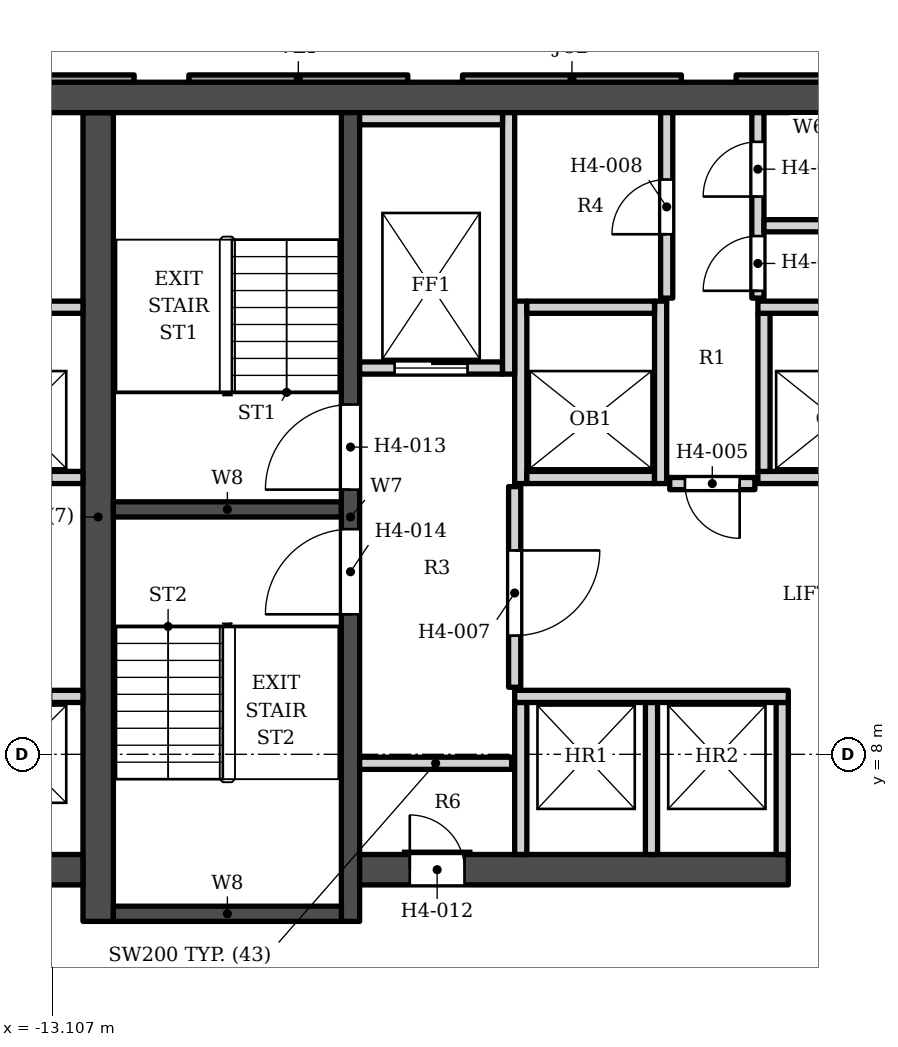
"""IFC4 building model, lengths in metres.
Left out: names, types, materials, properties, quantities, classifications, styles, units other than length and angle.
Written with IfcOpenShell. Run it as: python <this file> out.ifc"""

import sys

from ifc_helpers import new_model, si_unit, direction, frame, frame_2d, origin, place, context, subcontext, project, spatial, polyline, rectangle, outline, extrude, element, fill, save


model = new_model("IFC4")
c1 = context("Model", 3, precision=1e-05, world=origin(), true_north=direction((0.0, 1.0)))
c2 = subcontext(c1, "Body", "Model", "MODEL_VIEW")
j1 = project(units=[si_unit("LENGTHUNIT", "METRE"), si_unit("PLANEANGLEUNIT", "RADIAN")], contexts=[c1])
p1 = place(None, origin())
s1 = spatial("IfcSite", under=j1, at=p1, CompositionType="ELEMENT")
p2 = place(p1, origin())
s2 = spatial("IfcBuilding", under=s1, at=p2, CompositionType="ELEMENT")
p3 = place(p2, frame((0.0, 0.0, 76.6)))
s3 = spatial("IfcBuildingStorey", under=s2, at=p3, CompositionType="ELEMENT", Elevation=76.6)
p4 = place(p3, frame((-16.9, 18.802, 0.0), z_axis=(0.0, 0.0, 1.0), x_axis=(1.0, 0.0, 0.0)))
e1 = element("IfcWall", 1, at=p4, inside=s3, PredefinedType="SHEAR", context=c2, shape_type="SweptSolid", body=[
    extrude(rectangle(XDim=33.8, YDim=0.5, at=frame_2d((16.9, 0.0))), origin(), (0.0, 0.0, 1.0), 3.4),
])
p5 = place(p3, frame((-12.35, 5.253, 0.0), z_axis=(0.0, 0.0, 1.0), x_axis=(0.0, 1.0, 0.0)))
e2 = element("IfcWall", 2, at=p5, inside=s3, PredefinedType="SHEAR", context=c2, shape_type="SweptSolid", body=[
    extrude(rectangle(XDim=13.3, YDim=0.5, at=frame_2d((6.65, 0.0))), origin(), (0.0, 0.0, 1.0), 3.4),
])
p6 = place(p3, frame((-8.2, 5.253, 0.0), z_axis=(0.0, 0.0, 1.0), x_axis=(0.0, 1.0, 0.0)))
e3 = element("IfcWall", 3, at=p6, inside=s3, PredefinedType="SHEAR", context=c2, shape_type="SweptSolid", body=[
    extrude(rectangle(XDim=13.3, YDim=0.3, at=frame_2d((6.65, 0.0))), origin(), (0.0, 0.0, 1.0), 3.4),
])
p7 = place(p6, frame((7.1, 0.0, 0.0)))
e4 = element("IfcOpeningElement", 4, at=p7, cuts=e3, PredefinedType="OPENING", context=c2, shape_type="SweptSolid", body=[
    extrude(rectangle(XDim=1.4, YDim=2.1, at=frame_2d((0.7, 1.05))), frame((0.0, 0.16, 0.0), z_axis=(0.0, -1.0, 0.0), x_axis=(1.0, 0.0, 0.0)), (0.0, 0.0, 1.0), 0.32),
])
p8 = place(p6, frame((5.05, 0.0, 0.0)))
e5 = element("IfcOpeningElement", 5, at=p8, cuts=e3, PredefinedType="OPENING", context=c2, shape_type="SweptSolid", body=[
    extrude(rectangle(XDim=1.4, YDim=2.1, at=frame_2d((0.7, 1.05))), frame((0.0, 0.16, 0.0), z_axis=(0.0, -1.0, 0.0), x_axis=(1.0, 0.0, 0.0)), (0.0, 0.0, 1.0), 0.32),
])
for number, where, z_axis, x_axis in (
    (6, (-12.1, 12.028, 0.0), (0.0, 0.0, 1.0), (1.0, 0.0, 0.0)),
    (7, (-12.1, 5.378, 0.0), (0.0, 0.0, 1.0), (1.0, 0.0, 0.0)),
):
    element("IfcWall", number, at=place(p3, frame(where, z_axis=z_axis, x_axis=x_axis)), inside=s3, PredefinedType="SHEAR", context=c2, shape_type="SweptSolid", body=[
        extrude(rectangle(XDim=3.75, YDim=0.25, at=frame_2d((1.875, 0.0))), origin(), (0.0, 0.0, 1.0), 3.4),
    ])
p9 = place(p3, frame((-8.05, 6.103, 0.0), z_axis=(0.0, 0.0, 1.0), x_axis=(1.0, 0.0, 0.0)))
e8 = element("IfcWall", 8, at=p9, inside=s3, PredefinedType="SHEAR", context=c2, shape_type="SweptSolid", body=[
    extrude(rectangle(XDim=7.05, YDim=0.5, at=frame_2d((3.525, 0.0))), origin(), (0.0, 0.0, 1.0), 3.4),
])
p10 = place(p9, frame((0.825, 0.0, 0.0)))
e9 = element("IfcOpeningElement", 9, at=p10, cuts=e8, PredefinedType="OPENING", context=c2, shape_type="SweptSolid", body=[
    extrude(rectangle(XDim=0.9, YDim=2.1, at=frame_2d((0.45, 1.05))), frame((0.0, 0.26, 0.0), z_axis=(0.0, -1.0, 0.0), x_axis=(1.0, 0.0, 0.0)), (0.0, 0.0, 1.0), 0.52),
])
p11 = place(p3, frame((-12.6, 6.103, 0.0), z_axis=(0.0, 0.0, 1.0), x_axis=(-1.0, 0.0, 0.0)))
e10 = element("IfcWall", 10, at=p11, inside=s3, PredefinedType="SHEAR", context=c2, shape_type="SweptSolid", body=[
    extrude(rectangle(XDim=4.3, YDim=0.5, at=frame_2d((2.15, 0.0))), origin(), (0.0, 0.0, 1.0), 3.4),
])
p12 = place(p3, origin())
e11 = element("IfcWall", 11, at=p12, inside=s3, PredefinedType="ELEMENTEDWALL", context=c2, shape_type="SweptSolid", body=[
    extrude(outline(polyline([(-1.858, 19.173), (-1.858, 19.052), (1.742, 19.052), (1.742, 19.173), (-1.858, 19.173)])), origin(), (0.0, 0.0, 1.0), 2.65),
])
p13 = place(p3, origin())
e12 = element("IfcWall", 12, at=p13, inside=s3, PredefinedType="SOLIDWALL", context=c2, shape_type="SweptSolid", body=[
    extrude(outline(polyline([(-6.358, 19.173), (-6.358, 19.052), (-2.758, 19.052), (-2.758, 19.173), (-6.358, 19.173)])), origin(), (0.0, 0.0, 1.0), 2.65),
])
p14 = place(p3, origin())
e13 = element("IfcWall", 13, at=p14, inside=s3, PredefinedType="ELEMENTEDWALL", context=c2, shape_type="SweptSolid", body=[
    extrude(outline(polyline([(-10.858, 19.173), (-10.858, 19.052), (-7.258, 19.052), (-7.258, 19.173), (-10.858, 19.173)])), origin(), (0.0, 0.0, 1.0), 2.65),
])
p15 = place(p3, origin())
e14 = element("IfcWall", 14, at=p15, inside=s3, PredefinedType="SOLIDWALL", context=c2, shape_type="SweptSolid", body=[
    extrude(outline(polyline([(-15.358, 19.173), (-15.358, 19.052), (-11.758, 19.052), (-11.758, 19.173), (-15.358, 19.173)])), origin(), (0.0, 0.0, 1.0), 2.65),
])
for number, where, z_axis, x_axis in (
    (15, (-5.4, 6.353, 0.0), (0.0, 0.0, 1.0), (0.0, 1.0, 0.0)),
    (16, (-3.25, 6.353, 0.0), (0.0, 0.0, 1.0), (0.0, 1.0, 0.0)),
    (17, (-1.1, 6.353, 0.0), (0.0, 0.0, 1.0), (0.0, 1.0, 0.0)),
    (18, (-8.05, 7.853, 0.0), (0.0, 0.0, 1.0), (1.0, 0.0, 0.0)),
):
    element("IfcWall", number, at=place(p3, frame(where, z_axis=z_axis, x_axis=x_axis)), inside=s3, PredefinedType="SOLIDWALL", context=c2, shape_type="SweptSolid", body=[
        extrude(rectangle(XDim=2.5, YDim=0.2, at=frame_2d((1.25, 0.0))), origin(), (0.0, 0.0, 1.0), 3.23),
    ])
p16 = place(p3, frame((-16.9, 8.953, 0.0), z_axis=(0.0, 0.0, 1.0), x_axis=(1.0, 0.0, 0.0)))
e19 = element("IfcWall", 19, at=p16, inside=s3, PredefinedType="SOLIDWALL", context=c2, shape_type="SweptSolid", body=[
    extrude(rectangle(XDim=4.3, YDim=0.2, at=frame_2d((2.15, 0.0))), origin(), (0.0, 0.0, 1.0), 3.23),
])
p17 = place(p16, frame((2.675, 0.0, 0.0)))
e20 = element("IfcOpeningElement", 20, at=p17, cuts=e19, PredefinedType="OPENING", context=c2, shape_type="SweptSolid", body=[
    extrude(rectangle(XDim=1.1, YDim=2.1, at=frame_2d((0.55, 1.05))), frame((0.0, 0.11, 0.0), z_axis=(0.0, -1.0, 0.0), x_axis=(1.0, 0.0, 0.0)), (0.0, 0.0, 1.0), 0.22),
])
p18 = place(p16, frame((0.425, 0.0, 0.0)))
e21 = element("IfcOpeningElement", 21, at=p18, cuts=e19, PredefinedType="OPENING", context=c2, shape_type="SweptSolid", body=[
    extrude(rectangle(XDim=1.1, YDim=2.1, at=frame_2d((0.55, 1.05))), frame((0.0, 0.11, 0.0), z_axis=(0.0, -1.0, 0.0), x_axis=(1.0, 0.0, 0.0)), (0.0, 0.0, 1.0), 0.22),
])
p19 = place(p3, frame((-5.5, 8.953, 0.0), z_axis=(0.0, 0.0, 1.0), x_axis=(1.0, 0.0, 0.0)))
e22 = element("IfcWall", 22, at=p19, inside=s3, PredefinedType="SOLIDWALL", context=c2, shape_type="SweptSolid", body=[
    extrude(rectangle(XDim=4.5, YDim=0.2, at=frame_2d((2.25, 0.0))), origin(), (0.0, 0.0, 1.0), 3.23),
])
p20 = place(p3, frame((-5.5, 9.103, 0.0), z_axis=(0.0, 0.0, 1.0), x_axis=(0.0, 1.0, 0.0)))
e23 = element("IfcWall", 23, at=p20, inside=s3, PredefinedType="SOLIDWALL", context=c2, shape_type="SweptSolid", body=[
    extrude(rectangle(XDim=3.3, YDim=0.2, at=frame_2d((1.65, 0.0))), origin(), (0.0, 0.0, 1.0), 3.23),
])
p21 = place(p20, frame((0.85, 0.0, 0.0)))
e24 = element("IfcOpeningElement", 24, at=p21, cuts=e23, PredefinedType="OPENING", context=c2, shape_type="SweptSolid", body=[
    extrude(rectangle(XDim=1.4, YDim=2.1, at=frame_2d((0.7, 1.05))), frame((0.0, 0.11, 0.0), z_axis=(0.0, -1.0, 0.0), x_axis=(1.0, 0.0, 0.0)), (0.0, 0.0, 1.0), 0.22),
])
p22 = place(p3, frame((-2.95, 12.453, 0.0), z_axis=(0.0, 0.0, 1.0), x_axis=(1.0, 0.0, 0.0)))
e25 = element("IfcWall", 25, at=p22, inside=s3, PredefinedType="SOLIDWALL", context=c2, shape_type="SweptSolid", body=[
    extrude(rectangle(XDim=1.4, YDim=0.2, at=frame_2d((0.7, 0.0))), origin(), (0.0, 0.0, 1.0), 3.23),
])
p23 = place(p22, frame((0.25, 0.0, 0.0)))
e26 = element("IfcOpeningElement", 26, at=p23, cuts=e25, PredefinedType="OPENING", context=c2, shape_type="SweptSolid", body=[
    extrude(rectangle(XDim=0.9, YDim=2.1, at=frame_2d((0.45, 1.05))), frame((0.0, 0.11, 0.0), z_axis=(0.0, -1.0, 0.0), x_axis=(1.0, 0.0, 0.0)), (0.0, 0.0, 1.0), 0.22),
])
p24 = place(p3, frame((-16.9, 12.552, 0.0), z_axis=(0.0, 0.0, 1.0), x_axis=(1.0, 0.0, 0.0)))
e27 = element("IfcWall", 27, at=p24, inside=s3, PredefinedType="SOLIDWALL", context=c2, shape_type="SweptSolid", body=[
    extrude(rectangle(XDim=4.3, YDim=0.2, at=frame_2d((2.15, 0.0))), origin(), (0.0, 0.0, 1.0), 3.23),
])
p25 = place(p24, frame((2.675, 0.0, 0.0)))
e28 = element("IfcOpeningElement", 28, at=p25, cuts=e27, PredefinedType="OPENING", context=c2, shape_type="SweptSolid", body=[
    extrude(rectangle(XDim=1.1, YDim=2.1, at=frame_2d((0.55, 1.05))), frame((0.0, 0.11, 0.0), z_axis=(0.0, -1.0, 0.0), x_axis=(1.0, 0.0, 0.0)), (0.0, 0.0, 1.0), 0.22),
])
p26 = place(p24, frame((0.425, 0.0, 0.0)))
e29 = element("IfcOpeningElement", 29, at=p26, cuts=e27, PredefinedType="OPENING", context=c2, shape_type="SweptSolid", body=[
    extrude(rectangle(XDim=1.1, YDim=2.1, at=frame_2d((0.55, 1.05))), frame((0.0, 0.11, 0.0), z_axis=(0.0, -1.0, 0.0), x_axis=(1.0, 0.0, 0.0)), (0.0, 0.0, 1.0), 0.22),
])
p27 = place(p3, frame((-5.4, 12.453, 0.0), z_axis=(0.0, 0.0, 1.0), x_axis=(0.0, 1.0, 0.0)))
e30 = element("IfcWall", 30, at=p27, inside=s3, PredefinedType="SOLIDWALL", context=c2, shape_type="SweptSolid", body=[
    extrude(rectangle(XDim=3.0, YDim=0.2, at=frame_2d((1.5, 0.0))), origin(), (0.0, 0.0, 1.0), 3.23),
])
p28 = place(p3, frame((-5.3, 12.552, 0.0), z_axis=(0.0, 0.0, 1.0), x_axis=(1.0, 0.0, 0.0)))
e31 = element("IfcWall", 31, at=p28, inside=s3, PredefinedType="SOLIDWALL", context=c2, shape_type="SweptSolid", body=[
    extrude(rectangle(XDim=2.1, YDim=0.2, at=frame_2d((1.05, 0.0))), origin(), (0.0, 0.0, 1.0), 3.23),
])
p29 = place(p3, frame((-3.1, 12.453, 0.0), z_axis=(0.0, 0.0, 1.0), x_axis=(0.0, 1.0, 0.0)))
e32 = element("IfcWall", 32, at=p29, inside=s3, PredefinedType="SOLIDWALL", context=c2, shape_type="SweptSolid", body=[
    extrude(rectangle(XDim=3.0, YDim=0.2, at=frame_2d((1.5, 0.0))), origin(), (0.0, 0.0, 1.0), 3.23),
])
p30 = place(p3, frame((-1.5, 12.552, 0.0), z_axis=(0.0, 0.0, 1.0), x_axis=(1.0, 0.0, 0.0)))
e33 = element("IfcWall", 33, at=p30, inside=s3, PredefinedType="SOLIDWALL", context=c2, shape_type="SweptSolid", body=[
    extrude(rectangle(XDim=7.0, YDim=0.2, at=frame_2d((3.5, 0.0))), origin(), (0.0, 0.0, 1.0), 3.23),
])
p31 = place(p3, frame((-1.4, 12.653, 0.0), z_axis=(0.0, 0.0, 1.0), x_axis=(0.0, 1.0, 0.0)))
e34 = element("IfcWall", 34, at=p31, inside=s3, PredefinedType="SOLIDWALL", context=c2, shape_type="SweptSolid", body=[
    extrude(rectangle(XDim=2.6, YDim=0.2, at=frame_2d((1.3, 0.0))), origin(), (0.0, 0.0, 1.0), 3.23),
])
p32 = place(p3, frame((-8.05, 14.353, 0.0), z_axis=(0.0, 0.0, 1.0), x_axis=(1.0, 0.0, 0.0)))
e35 = element("IfcWall", 35, at=p32, inside=s3, PredefinedType="SOLIDWALL", context=c2, shape_type="SweptSolid", body=[
    extrude(rectangle(XDim=2.35, YDim=0.2, at=frame_2d((1.175, 0.0))), origin(), (0.0, 0.0, 1.0), 3.23),
])
p33 = place(p32, frame((0.575, 0.0, 0.0)))
e36 = element("IfcOpeningElement", 36, at=p33, cuts=e35, PredefinedType="OPENING", context=c2, shape_type="SweptSolid", body=[
    extrude(rectangle(XDim=1.2, YDim=2.1, at=frame_2d((0.6, 1.05))), frame((0.0, 0.11, 0.0), z_axis=(0.0, -1.0, 0.0), x_axis=(1.0, 0.0, 0.0)), (0.0, 0.0, 1.0), 0.22),
])
for number, where, z_axis, x_axis in (
    (37, (-5.6, 14.253, 0.0), (0.0, 0.0, 1.0), (0.0, 1.0, 0.0)),
    (38, (-16.9, 15.353, 0.0), (0.0, 0.0, 1.0), (1.0, 0.0, 0.0)),
):
    element("IfcWall", number, at=place(p3, frame(where, z_axis=z_axis, x_axis=x_axis)), inside=s3, PredefinedType="SOLIDWALL", context=c2, shape_type="SweptSolid", body=[
        extrude(rectangle(XDim=4.3, YDim=0.2, at=frame_2d((2.15, 0.0))), origin(), (0.0, 0.0, 1.0), 3.23),
    ])
p34 = place(p3, frame((-5.3, 15.353, 0.0), z_axis=(0.0, 0.0, 1.0), x_axis=(1.0, 0.0, 0.0)))
e39 = element("IfcWall", 39, at=p34, inside=s3, PredefinedType="SOLIDWALL", context=c2, shape_type="SweptSolid", body=[
    extrude(rectangle(XDim=2.1, YDim=0.2, at=frame_2d((1.05, 0.0))), origin(), (0.0, 0.0, 1.0), 3.23),
])
p35 = place(p3, frame((-1.5, 15.353, 0.0), z_axis=(0.0, 0.0, 1.0), x_axis=(1.0, 0.0, 0.0)))
e40 = element("IfcWall", 40, at=p35, inside=s3, PredefinedType="SOLIDWALL", context=c2, shape_type="SweptSolid", body=[
    extrude(rectangle(XDim=7.2, YDim=0.2, at=frame_2d((3.6, 0.0))), origin(), (0.0, 0.0, 1.0), 3.23),
])
p36 = place(p3, frame((-3.0, 15.503, 0.0), z_axis=(0.0, 0.0, 1.0), x_axis=(0.0, 1.0, 0.0)))
e41 = element("IfcWall", 41, at=p36, inside=s3, PredefinedType="SOLIDWALL", context=c2, shape_type="SweptSolid", body=[
    extrude(rectangle(XDim=3.05, YDim=0.2, at=frame_2d((1.525, 0.0))), origin(), (0.0, 0.0, 1.0), 3.23),
])
p37 = place(p36, frame((1.05, 0.0, 0.0)))
e42 = element("IfcOpeningElement", 42, at=p37, cuts=e41, PredefinedType="OPENING", context=c2, shape_type="SweptSolid", body=[
    extrude(rectangle(XDim=0.9, YDim=2.1, at=frame_2d((0.45, 1.05))), frame((0.0, 0.11, 0.0), z_axis=(0.0, -1.0, 0.0), x_axis=(1.0, 0.0, 0.0)), (0.0, 0.0, 1.0), 0.22),
])
p38 = place(p3, frame((-1.5, 15.503, 0.0), z_axis=(0.0, 0.0, 1.0), x_axis=(0.0, 1.0, 0.0)))
e43 = element("IfcWall", 43, at=p38, inside=s3, PredefinedType="SOLIDWALL", context=c2, shape_type="SweptSolid", body=[
    extrude(rectangle(XDim=3.05, YDim=0.2, at=frame_2d((1.525, 0.0))), origin(), (0.0, 0.0, 1.0), 3.23),
])
p39 = place(p38, frame((0.12, 0.0, 0.0)))
e44 = element("IfcOpeningElement", 44, at=p39, cuts=e43, PredefinedType="OPENING", context=c2, shape_type="SweptSolid", body=[
    extrude(rectangle(XDim=0.9, YDim=2.1, at=frame_2d((0.45, 1.05))), frame((0.0, 0.11, 0.0), z_axis=(0.0, -1.0, 0.0), x_axis=(1.0, 0.0, 0.0)), (0.0, 0.0, 1.0), 0.22),
])
p40 = place(p38, frame((1.67, 0.0, 0.0)))
e45 = element("IfcOpeningElement", 45, at=p40, cuts=e43, PredefinedType="OPENING", context=c2, shape_type="SweptSolid", body=[
    extrude(rectangle(XDim=0.9, YDim=2.1, at=frame_2d((0.45, 1.05))), frame((0.0, 0.11, 0.0), z_axis=(0.0, -1.0, 0.0), x_axis=(1.0, 0.0, 0.0)), (0.0, 0.0, 1.0), 0.22),
])
p41 = place(p3, frame((-1.4, 16.693, 0.0), z_axis=(0.0, 0.0, 1.0), x_axis=(1.0, 0.0, 0.0)))
e46 = element("IfcWall", 46, at=p41, inside=s3, PredefinedType="SOLIDWALL", context=c2, shape_type="SweptSolid", body=[
    extrude(rectangle(XDim=6.85, YDim=0.2, at=frame_2d((3.425, 0.0))), origin(), (0.0, 0.0, 1.0), 3.23),
])
p42 = place(p3, frame((-8.05, 18.453, 0.0), z_axis=(0.0, 0.0, 1.0), x_axis=(1.0, 0.0, 0.0)))
e47 = element("IfcWall", 47, at=p42, inside=s3, PredefinedType="SOLIDWALL", context=c2, shape_type="SweptSolid", body=[
    extrude(rectangle(XDim=2.35, YDim=0.2, at=frame_2d((1.175, 0.0))), origin(), (0.0, 0.0, 1.0), 3.23),
])
p43 = place(p33, origin())
e48 = element("IfcDoor", 48, at=p43, inside=s3, OperationType="DOUBLE_DOOR_SLIDING", PredefinedType="DOOR", context=c2, shape_type="SweptSolid", body=[
    extrude(rectangle(XDim=1.2, YDim=2.1, at=frame_2d((0.6, 1.05))), frame((0.0, 0.025, 0.0), z_axis=(0.0, -1.0, 0.0), x_axis=(1.0, 0.0, 0.0)), (0.0, 0.0, 1.0), 0.05),
])
fill(e36, e48)
p44 = place(p7, origin())
e49 = element("IfcDoor", 49, at=p44, inside=s3, OperationType="SINGLE_SWING_LEFT", PredefinedType="DOOR", context=c2, shape_type="SweptSolid", body=[
    extrude(rectangle(XDim=1.4, YDim=2.1, at=frame_2d((0.7, 1.05))), frame((0.0, 0.025, 0.0), z_axis=(0.0, -1.0, 0.0), x_axis=(1.0, 0.0, 0.0)), (0.0, 0.0, 1.0), 0.05),
])
fill(e4, e49)
p45 = place(p8, origin())
e50 = element("IfcDoor", 50, at=p45, inside=s3, OperationType="SINGLE_SWING_LEFT", PredefinedType="DOOR", context=c2, shape_type="SweptSolid", body=[
    extrude(rectangle(XDim=1.4, YDim=2.1, at=frame_2d((0.7, 1.05))), frame((0.0, 0.025, 0.0), z_axis=(0.0, -1.0, 0.0), x_axis=(1.0, 0.0, 0.0)), (0.0, 0.0, 1.0), 0.05),
])
fill(e5, e50)
p46 = place(p23, origin())
e51 = element("IfcDoor", 51, at=p46, inside=s3, OperationType="SINGLE_SWING_RIGHT", PredefinedType="DOOR", context=c2, shape_type="SweptSolid", body=[
    extrude(rectangle(XDim=0.9, YDim=2.1, at=frame_2d((0.45, 1.05))), frame((0.0, 0.025, 0.0), z_axis=(0.0, -1.0, 0.0), x_axis=(1.0, 0.0, 0.0)), (0.0, 0.0, 1.0), 0.05),
])
fill(e26, e51)
p47 = place(p21, origin())
e52 = element("IfcDoor", 52, at=p47, inside=s3, OperationType="SINGLE_SWING_RIGHT", PredefinedType="DOOR", context=c2, shape_type="SweptSolid", body=[
    extrude(rectangle(XDim=1.4, YDim=2.1, at=frame_2d((0.7, 1.05))), frame((0.0, 0.025, 0.0), z_axis=(0.0, -1.0, 0.0), x_axis=(1.0, 0.0, 0.0)), (0.0, 0.0, 1.0), 0.05),
])
fill(e24, e52)
p48 = place(p37, origin())
e53 = element("IfcDoor", 53, at=p48, inside=s3, OperationType="SINGLE_SWING_LEFT", PredefinedType="DOOR", context=c2, shape_type="SweptSolid", body=[
    extrude(rectangle(XDim=0.9, YDim=2.1, at=frame_2d((0.45, 1.05))), frame((0.0, 0.025, 0.0), z_axis=(0.0, -1.0, 0.0), x_axis=(1.0, 0.0, 0.0)), (0.0, 0.0, 1.0), 0.05),
])
fill(e42, e53)
p49 = place(p39, origin())
e54 = element("IfcDoor", 54, at=p49, inside=s3, OperationType="SINGLE_SWING_LEFT", PredefinedType="DOOR", context=c2, shape_type="SweptSolid", body=[
    extrude(rectangle(XDim=0.9, YDim=2.1, at=frame_2d((0.45, 1.05))), frame((0.0, 0.025, 0.0), z_axis=(0.0, -1.0, 0.0), x_axis=(1.0, 0.0, 0.0)), (0.0, 0.0, 1.0), 0.05),
])
fill(e44, e54)
p50 = place(p40, origin())
e55 = element("IfcDoor", 55, at=p50, inside=s3, OperationType="SINGLE_SWING_LEFT", PredefinedType="DOOR", context=c2, shape_type="SweptSolid", body=[
    extrude(rectangle(XDim=0.9, YDim=2.1, at=frame_2d((0.45, 1.05))), frame((0.0, 0.025, 0.0), z_axis=(0.0, -1.0, 0.0), x_axis=(1.0, 0.0, 0.0)), (0.0, 0.0, 1.0), 0.05),
])
fill(e45, e55)
p51 = place(p10, origin())
e56 = element("IfcDoor", 56, at=p51, inside=s3, OperationType="SINGLE_SWING_LEFT", PredefinedType="DOOR", context=c2, shape_type="SweptSolid", body=[
    extrude(rectangle(XDim=0.9, YDim=2.1, at=frame_2d((0.45, 1.05))), frame((0.0, 0.025, 0.0), z_axis=(0.0, -1.0, 0.0), x_axis=(1.0, 0.0, 0.0)), (0.0, 0.0, 1.0), 0.05),
])
fill(e9, e56)
save(model, sys.argv[1])
